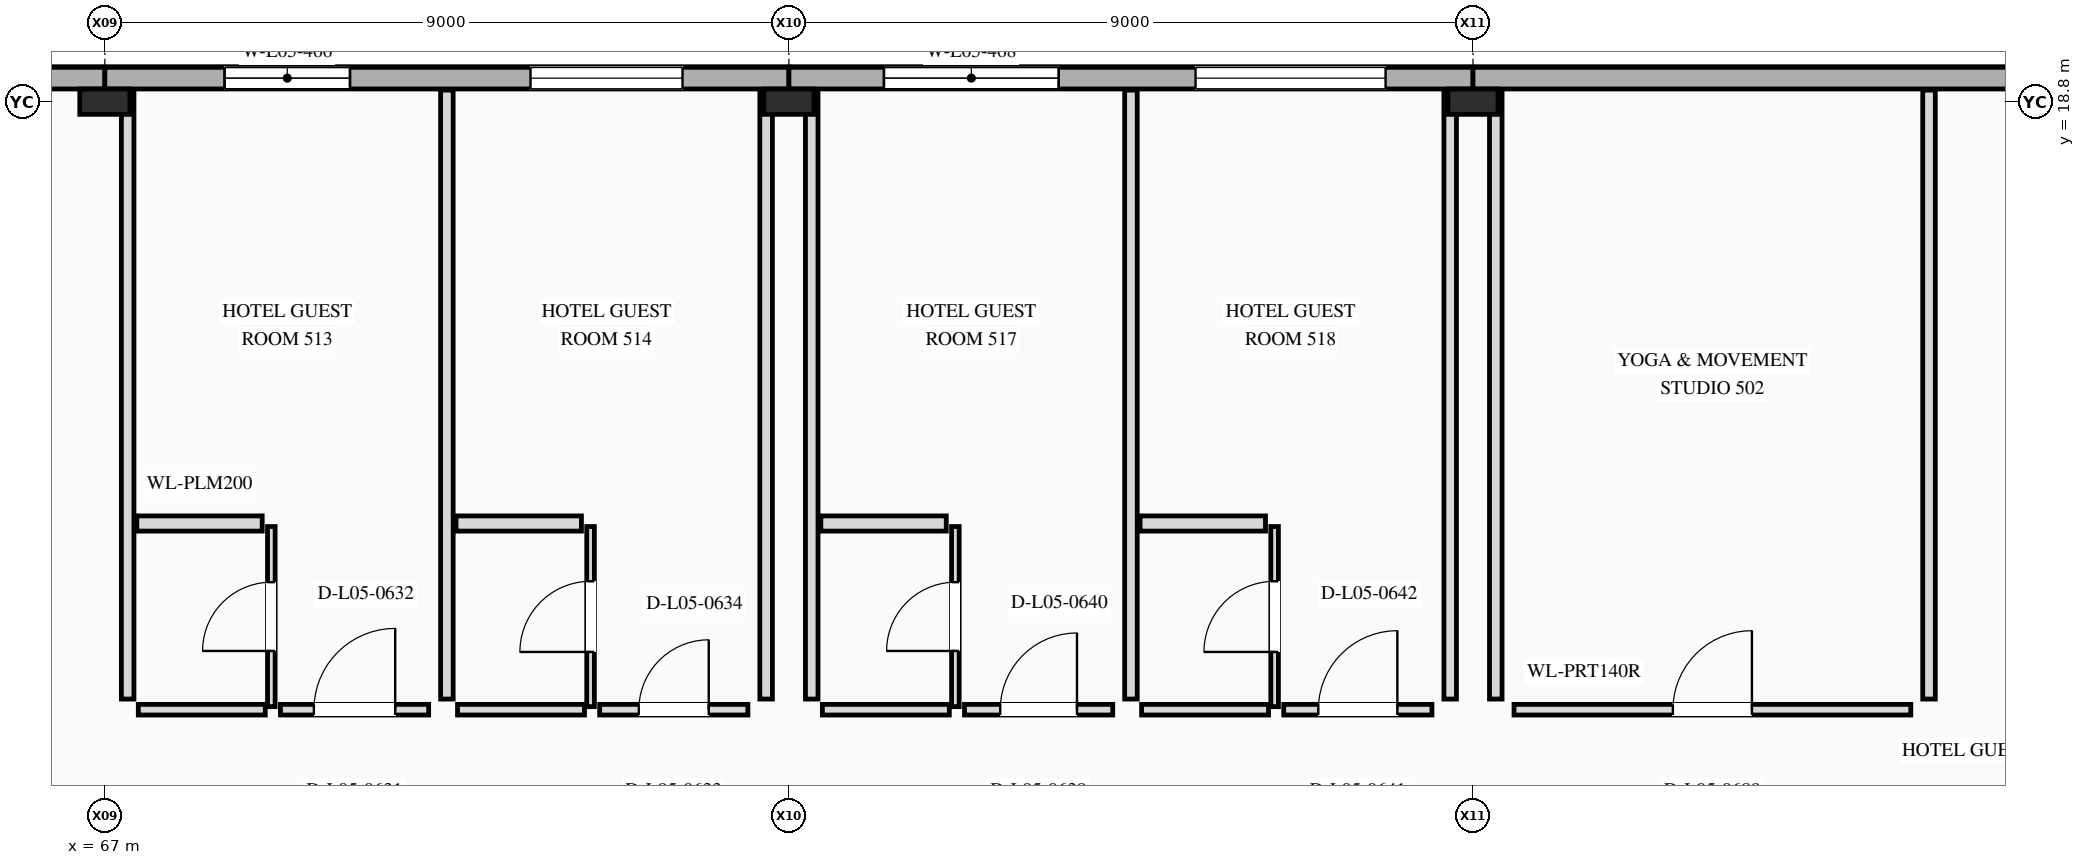
"""IFC4 building model, lengths in metres.
Left out: names, types, materials, properties, quantities, classifications, styles, units other than length and angle.
Written with IfcOpenShell. Run it as: python <this file> out.ifc"""

import sys

from ifc_helpers import new_model, si_unit, direction, frame, frame_2d, origin, origin_2d, place, context, subcontext, project, spatial, rectangle, i_section, extrude, element, fill, save


model = new_model("IFC4")
c1 = context("Model", 3, precision=1e-05, world=origin(), true_north=direction((0.0, 1.0)))
c2 = subcontext(c1, "Body", "Model", "MODEL_VIEW")
j1 = project(units=[si_unit("LENGTHUNIT", "METRE"), si_unit("PLANEANGLEUNIT", "RADIAN")], contexts=[c1])
p1 = place(None, origin())
s1 = spatial("IfcSite", under=j1, at=p1, CompositionType="ELEMENT")
p2 = place(p1, origin())
s2 = spatial("IfcBuilding", under=s1, at=p2, CompositionType="ELEMENT")
p3 = place(p2, frame((0.0, 0.0, 23.4)))
s3 = spatial("IfcBuildingStorey", under=s2, at=p3, CompositionType="ELEMENT", Elevation=23.4)
for number, where, z_axis, x_axis in (
    (1, (67.0, 18.8, 0.0), (0.0, 0.0, 1.0), (0.0, 1.0, 0.0)),
    (2, (76.0, 18.8, 0.0), (0.0, 0.0, 1.0), (0.0, 1.0, 0.0)),
    (3, (85.0, 18.8, 0.0), (0.0, 0.0, 1.0), (0.0, 1.0, 0.0)),
):
    element("IfcColumn", number, at=place(p3, frame(where, z_axis=z_axis, x_axis=x_axis)), inside=s3, PredefinedType="COLUMN", context=c2, shape_type="SweptSolid", body=[
        extrude(i_section(OverallWidth=0.333, OverallDepth=0.66, WebThickness=0.024, FlangeThickness=0.044, at=origin_2d()), origin(), (0.0, 0.0, 1.0), 3.6),
    ])
p4 = place(p3, frame((67.0, 19.11, 0.0), z_axis=(0.0, 0.0, 1.0), x_axis=(-1.0, 0.0, 0.0)))
e4 = element("IfcWall", 4, at=p4, inside=s3, PredefinedType="STANDARD", context=c2, shape_type="SweptSolid", body=[
    extrude(rectangle(XDim=9.0, YDim=0.285, at=frame_2d((4.5, 0.0))), origin(), (0.0, 0.0, 1.0), 3.6),
])
p5 = place(p3, frame((76.0, 19.11, 0.0), z_axis=(0.0, 0.0, 1.0), x_axis=(-1.0, 0.0, 0.0)))
e5 = element("IfcWall", 5, at=p5, inside=s3, PredefinedType="STANDARD", context=c2, shape_type="SweptSolid", body=[
    extrude(rectangle(XDim=9.0, YDim=0.285, at=frame_2d((4.5, 0.0))), origin(), (0.0, 0.0, 1.0), 3.6),
])
p6 = place(p5, frame((5.775, 0.0, 0.85)))
e6 = element("IfcOpeningElement", 6, at=p6, cuts=e5, PredefinedType="OPENING", context=c2, shape_type="SweptSolid", body=[
    extrude(rectangle(XDim=1.65, YDim=1.75, at=frame_2d((0.825, 0.875))), frame((0.0, 0.152, 0.0), z_axis=(0.0, -1.0, 0.0), x_axis=(1.0, 0.0, 0.0)), (0.0, 0.0, 1.0), 0.305),
])
p7 = place(p5, frame((1.4, 0.0, 0.85)))
e7 = element("IfcOpeningElement", 7, at=p7, cuts=e5, PredefinedType="OPENING", context=c2, shape_type="SweptSolid", body=[
    extrude(rectangle(XDim=2.0, YDim=1.65, at=frame_2d((1.0, 0.825))), frame((0.0, 0.152, 0.0), z_axis=(0.0, -1.0, 0.0), x_axis=(1.0, 0.0, 0.0)), (0.0, 0.0, 1.0), 0.305),
])
p8 = place(p3, frame((85.0, 19.11, 0.0), z_axis=(0.0, 0.0, 1.0), x_axis=(-1.0, 0.0, 0.0)))
e8 = element("IfcWall", 8, at=p8, inside=s3, PredefinedType="STANDARD", context=c2, shape_type="SweptSolid", body=[
    extrude(rectangle(XDim=9.0, YDim=0.285, at=frame_2d((4.5, 0.0))), origin(), (0.0, 0.0, 1.0), 3.6),
])
p9 = place(p8, frame((5.45, 0.0, 0.85)))
e9 = element("IfcOpeningElement", 9, at=p9, cuts=e8, PredefinedType="OPENING", context=c2, shape_type="SweptSolid", body=[
    extrude(rectangle(XDim=2.3, YDim=1.7, at=frame_2d((1.15, 0.85))), frame((0.0, 0.152, 0.0), z_axis=(0.0, -1.0, 0.0), x_axis=(1.0, 0.0, 0.0)), (0.0, 0.0, 1.0), 0.305),
])
p10 = place(p8, frame((1.15, 0.0, 0.85)))
e10 = element("IfcOpeningElement", 10, at=p10, cuts=e8, PredefinedType="OPENING", context=c2, shape_type="SweptSolid", body=[
    extrude(rectangle(XDim=2.5, YDim=1.75, at=frame_2d((1.25, 0.875))), frame((0.0, 0.152, 0.0), z_axis=(0.0, -1.0, 0.0), x_axis=(1.0, 0.0, 0.0)), (0.0, 0.0, 1.0), 0.305),
])
p11 = place(p3, frame((94.0, 19.11, 0.0), z_axis=(0.0, 0.0, 1.0), x_axis=(-1.0, 0.0, 0.0)))
e11 = element("IfcWall", 11, at=p11, inside=s3, PredefinedType="STANDARD", context=c2, shape_type="SweptSolid", body=[
    extrude(rectangle(XDim=9.0, YDim=0.285, at=frame_2d((4.5, 0.0))), origin(), (0.0, 0.0, 1.0), 3.6),
])
p12 = place(p3, frame((67.44, 10.8, 0.0), z_axis=(0.0, 0.0, 1.0), x_axis=(1.0, 0.0, 0.0)))
e12 = element("IfcWall", 12, at=p12, inside=s3, PredefinedType="PARTITIONING", context=c2, shape_type="SweptSolid", body=[
    extrude(rectangle(XDim=1.67, YDim=0.14, at=frame_2d((0.835, 0.0))), origin(), (0.0, 0.0, 1.0), 3.3),
])
p13 = place(p3, frame((69.31, 10.8, 0.0), z_axis=(0.0, 0.0, 1.0), x_axis=(1.0, 0.0, 0.0)))
e13 = element("IfcWall", 13, at=p13, inside=s3, PredefinedType="PARTITIONING", context=c2, shape_type="SweptSolid", body=[
    extrude(rectangle(XDim=1.95, YDim=0.14, at=frame_2d((0.975, 0.0))), origin(), (0.0, 0.0, 1.0), 3.3),
])
p14 = place(p13, frame((0.44, 0.0, 0.0)))
e14 = element("IfcOpeningElement", 14, at=p14, cuts=e13, PredefinedType="OPENING", context=c2, shape_type="SweptSolid", body=[
    extrude(rectangle(XDim=1.07, YDim=2.25, at=frame_2d((0.535, 1.125))), frame((0.0, 0.08, 0.0), z_axis=(0.0, -1.0, 0.0), x_axis=(1.0, 0.0, 0.0)), (0.0, 0.0, 1.0), 0.16),
])
p15 = place(p3, frame((67.3, 10.94, 0.0), z_axis=(0.0, 0.0, 1.0), x_axis=(0.0, 1.0, 0.0)))
e15 = element("IfcWall", 15, at=p15, inside=s3, PredefinedType="PARTITIONING", context=c2, shape_type="SweptSolid", body=[
    extrude(rectangle(XDim=8.012, YDim=0.165, at=frame_2d((4.006, 0.0))), origin(), (0.0, 0.0, 1.0), 2.629),
])
p16 = place(p3, frame((71.5, 10.94, 0.0), z_axis=(0.0, 0.0, 1.0), x_axis=(0.0, 1.0, 0.0)))
e16 = element("IfcWall", 16, at=p16, inside=s3, PredefinedType="PARTITIONING", context=c2, shape_type="SweptSolid", body=[
    extrude(rectangle(XDim=8.012, YDim=0.165, at=frame_2d((4.006, 0.0))), origin(), (0.0, 0.0, 1.0), 2.713),
])
p17 = place(p3, frame((69.19, 10.84, 0.0), z_axis=(0.0, 0.0, 1.0), x_axis=(0.0, 1.0, 0.0)))
e17 = element("IfcWall", 17, at=p17, inside=s3, PredefinedType="PARTITIONING", context=c2, shape_type="SweptSolid", body=[
    extrude(rectangle(XDim=2.37, YDim=0.1, at=frame_2d((1.185, 0.0))), origin(), (0.0, 0.0, 1.0), 2.908),
])
p18 = place(p17, frame((0.733, 0.0, 0.0)))
e18 = element("IfcOpeningElement", 18, at=p18, cuts=e17, PredefinedType="OPENING", context=c2, shape_type="SweptSolid", body=[
    extrude(rectangle(XDim=0.905, YDim=2.1, at=frame_2d((0.453, 1.05))), frame((0.0, 0.06, 0.0), z_axis=(0.0, -1.0, 0.0), x_axis=(1.0, 0.0, 0.0)), (0.0, 0.0, 1.0), 0.12),
])
p19 = place(p3, frame((67.42, 13.25, 0.0), z_axis=(0.0, 0.0, 1.0), x_axis=(1.0, 0.0, 0.0)))
e19 = element("IfcWall", 19, at=p19, inside=s3, PredefinedType="PLUMBINGWALL", context=c2, shape_type="SweptSolid", body=[
    extrude(rectangle(XDim=1.65, YDim=0.2, at=frame_2d((0.825, 0.0))), origin(), (0.0, 0.0, 1.0), 3.3),
])
p20 = place(p3, frame((71.64, 10.8, 0.0), z_axis=(0.0, 0.0, 1.0), x_axis=(1.0, 0.0, 0.0)))
e20 = element("IfcWall", 20, at=p20, inside=s3, PredefinedType="PARTITIONING", context=c2, shape_type="SweptSolid", body=[
    extrude(rectangle(XDim=1.67, YDim=0.14, at=frame_2d((0.835, 0.0))), origin(), (0.0, 0.0, 1.0), 3.3),
])
p21 = place(p3, frame((73.51, 10.8, 0.0), z_axis=(0.0, 0.0, 1.0), x_axis=(1.0, 0.0, 0.0)))
e21 = element("IfcWall", 21, at=p21, inside=s3, PredefinedType="PARTITIONING", context=c2, shape_type="SweptSolid", body=[
    extrude(rectangle(XDim=1.95, YDim=0.14, at=frame_2d((0.975, 0.0))), origin(), (0.0, 0.0, 1.0), 3.3),
])
p22 = place(p21, frame((0.515, 0.0, 0.0)))
e22 = element("IfcOpeningElement", 22, at=p22, cuts=e21, PredefinedType="OPENING", context=c2, shape_type="SweptSolid", body=[
    extrude(rectangle(XDim=0.92, YDim=2.3, at=frame_2d((0.46, 1.15))), frame((0.0, 0.08, 0.0), z_axis=(0.0, -1.0, 0.0), x_axis=(1.0, 0.0, 0.0)), (0.0, 0.0, 1.0), 0.16),
])
p23 = place(p3, frame((75.7, 10.94, 0.0), z_axis=(0.0, 0.0, 1.0), x_axis=(0.0, 1.0, 0.0)))
e23 = element("IfcWall", 23, at=p23, inside=s3, PredefinedType="PARTITIONING", context=c2, shape_type="SweptSolid", body=[
    extrude(rectangle(XDim=8.012, YDim=0.165, at=frame_2d((4.006, 0.0))), origin(), (0.0, 0.0, 1.0), 2.629),
])
p24 = place(p3, frame((73.39, 10.84, 0.0), z_axis=(0.0, 0.0, 1.0), x_axis=(0.0, 1.0, 0.0)))
e24 = element("IfcWall", 24, at=p24, inside=s3, PredefinedType="PARTITIONING", context=c2, shape_type="SweptSolid", body=[
    extrude(rectangle(XDim=2.37, YDim=0.1, at=frame_2d((1.185, 0.0))), origin(), (0.0, 0.0, 1.0), 2.908),
])
p25 = place(p24, frame((0.72, 0.0, 0.0)))
e25 = element("IfcOpeningElement", 25, at=p25, cuts=e24, PredefinedType="OPENING", context=c2, shape_type="SweptSolid", body=[
    extrude(rectangle(XDim=0.93, YDim=2.14, at=frame_2d((0.465, 1.07))), frame((0.0, 0.06, 0.0), z_axis=(0.0, -1.0, 0.0), x_axis=(1.0, 0.0, 0.0)), (0.0, 0.0, 1.0), 0.12),
])
p26 = place(p3, frame((71.62, 13.25, 0.0), z_axis=(0.0, 0.0, 1.0), x_axis=(1.0, 0.0, 0.0)))
e26 = element("IfcWall", 26, at=p26, inside=s3, PredefinedType="PLUMBINGWALL", context=c2, shape_type="SweptSolid", body=[
    extrude(rectangle(XDim=1.65, YDim=0.2, at=frame_2d((0.825, 0.0))), origin(), (0.0, 0.0, 1.0), 3.3),
])
p27 = place(p3, frame((76.44, 10.8, 0.0), z_axis=(0.0, 0.0, 1.0), x_axis=(1.0, 0.0, 0.0)))
e27 = element("IfcWall", 27, at=p27, inside=s3, PredefinedType="PARTITIONING", context=c2, shape_type="SweptSolid", body=[
    extrude(rectangle(XDim=1.67, YDim=0.14, at=frame_2d((0.835, 0.0))), origin(), (0.0, 0.0, 1.0), 3.3),
])
p28 = place(p3, frame((78.31, 10.8, 0.0), z_axis=(0.0, 0.0, 1.0), x_axis=(1.0, 0.0, 0.0)))
e28 = element("IfcWall", 28, at=p28, inside=s3, PredefinedType="PARTITIONING", context=c2, shape_type="SweptSolid", body=[
    extrude(rectangle(XDim=1.95, YDim=0.14, at=frame_2d((0.975, 0.0))), origin(), (0.0, 0.0, 1.0), 3.3),
])
p29 = place(p28, frame((0.47, 0.0, 0.0)))
e29 = element("IfcOpeningElement", 29, at=p29, cuts=e28, PredefinedType="OPENING", context=c2, shape_type="SweptSolid", body=[
    extrude(rectangle(XDim=1.01, YDim=2.35, at=frame_2d((0.505, 1.175))), frame((0.0, 0.08, 0.0), z_axis=(0.0, -1.0, 0.0), x_axis=(1.0, 0.0, 0.0)), (0.0, 0.0, 1.0), 0.16),
])
p30 = place(p3, frame((76.3, 10.94, 0.0), z_axis=(0.0, 0.0, 1.0), x_axis=(0.0, 1.0, 0.0)))
e30 = element("IfcWall", 30, at=p30, inside=s3, PredefinedType="PARTITIONING", context=c2, shape_type="SweptSolid", body=[
    extrude(rectangle(XDim=8.012, YDim=0.165, at=frame_2d((4.006, 0.0))), origin(), (0.0, 0.0, 1.0), 2.629),
])
p31 = place(p3, frame((80.5, 10.94, 0.0), z_axis=(0.0, 0.0, 1.0), x_axis=(0.0, 1.0, 0.0)))
e31 = element("IfcWall", 31, at=p31, inside=s3, PredefinedType="PARTITIONING", context=c2, shape_type="SweptSolid", body=[
    extrude(rectangle(XDim=8.012, YDim=0.165, at=frame_2d((4.006, 0.0))), origin(), (0.0, 0.0, 1.0), 2.713),
])
p32 = place(p3, frame((78.19, 10.84, 0.0), z_axis=(0.0, 0.0, 1.0), x_axis=(0.0, 1.0, 0.0)))
e32 = element("IfcWall", 32, at=p32, inside=s3, PredefinedType="PARTITIONING", context=c2, shape_type="SweptSolid", body=[
    extrude(rectangle(XDim=2.37, YDim=0.1, at=frame_2d((1.185, 0.0))), origin(), (0.0, 0.0, 1.0), 2.908),
])
p33 = place(p32, frame((0.733, 0.0, 0.0)))
e33 = element("IfcOpeningElement", 33, at=p33, cuts=e32, PredefinedType="OPENING", context=c2, shape_type="SweptSolid", body=[
    extrude(rectangle(XDim=0.905, YDim=2.18, at=frame_2d((0.453, 1.09))), frame((0.0, 0.06, 0.0), z_axis=(0.0, -1.0, 0.0), x_axis=(1.0, 0.0, 0.0)), (0.0, 0.0, 1.0), 0.12),
])
p34 = place(p3, frame((76.42, 13.25, 0.0), z_axis=(0.0, 0.0, 1.0), x_axis=(1.0, 0.0, 0.0)))
e34 = element("IfcWall", 34, at=p34, inside=s3, PredefinedType="PLUMBINGWALL", context=c2, shape_type="SweptSolid", body=[
    extrude(rectangle(XDim=1.65, YDim=0.2, at=frame_2d((0.825, 0.0))), origin(), (0.0, 0.0, 1.0), 3.3),
])
p35 = place(p3, frame((80.64, 10.8, 0.0), z_axis=(0.0, 0.0, 1.0), x_axis=(1.0, 0.0, 0.0)))
e35 = element("IfcWall", 35, at=p35, inside=s3, PredefinedType="PARTITIONING", context=c2, shape_type="SweptSolid", body=[
    extrude(rectangle(XDim=1.67, YDim=0.14, at=frame_2d((0.835, 0.0))), origin(), (0.0, 0.0, 1.0), 3.3),
])
p36 = place(p3, frame((82.51, 10.8, 0.0), z_axis=(0.0, 0.0, 1.0), x_axis=(1.0, 0.0, 0.0)))
e36 = element("IfcWall", 36, at=p36, inside=s3, PredefinedType="PARTITIONING", context=c2, shape_type="SweptSolid", body=[
    extrude(rectangle(XDim=1.95, YDim=0.14, at=frame_2d((0.975, 0.0))), origin(), (0.0, 0.0, 1.0), 3.3),
])
p37 = place(p36, frame((0.455, 0.0, 0.0)))
e37 = element("IfcOpeningElement", 37, at=p37, cuts=e36, PredefinedType="OPENING", context=c2, shape_type="SweptSolid", body=[
    extrude(rectangle(XDim=1.04, YDim=2.4, at=frame_2d((0.52, 1.2))), frame((0.0, 0.08, 0.0), z_axis=(0.0, -1.0, 0.0), x_axis=(1.0, 0.0, 0.0)), (0.0, 0.0, 1.0), 0.16),
])
p38 = place(p3, frame((84.7, 10.94, 0.0), z_axis=(0.0, 0.0, 1.0), x_axis=(0.0, 1.0, 0.0)))
e38 = element("IfcWall", 38, at=p38, inside=s3, PredefinedType="PARTITIONING", context=c2, shape_type="SweptSolid", body=[
    extrude(rectangle(XDim=8.012, YDim=0.165, at=frame_2d((4.006, 0.0))), origin(), (0.0, 0.0, 1.0), 2.629),
])
p39 = place(p3, frame((82.39, 10.84, 0.0), z_axis=(0.0, 0.0, 1.0), x_axis=(0.0, 1.0, 0.0)))
e39 = element("IfcWall", 39, at=p39, inside=s3, PredefinedType="PARTITIONING", context=c2, shape_type="SweptSolid", body=[
    extrude(rectangle(XDim=2.37, YDim=0.1, at=frame_2d((1.185, 0.0))), origin(), (0.0, 0.0, 1.0), 2.908),
])
p40 = place(p39, frame((0.72, 0.0, 0.0)))
e40 = element("IfcOpeningElement", 40, at=p40, cuts=e39, PredefinedType="OPENING", context=c2, shape_type="SweptSolid", body=[
    extrude(rectangle(XDim=0.93, YDim=2.22, at=frame_2d((0.465, 1.11))), frame((0.0, 0.06, 0.0), z_axis=(0.0, -1.0, 0.0), x_axis=(1.0, 0.0, 0.0)), (0.0, 0.0, 1.0), 0.12),
])
p41 = place(p3, frame((80.62, 13.25, 0.0), z_axis=(0.0, 0.0, 1.0), x_axis=(1.0, 0.0, 0.0)))
e41 = element("IfcWall", 41, at=p41, inside=s3, PredefinedType="PLUMBINGWALL", context=c2, shape_type="SweptSolid", body=[
    extrude(rectangle(XDim=1.65, YDim=0.2, at=frame_2d((0.825, 0.0))), origin(), (0.0, 0.0, 1.0), 3.3),
])
p42 = place(p3, frame((85.54, 10.8, 0.0), z_axis=(0.0, 0.0, 1.0), x_axis=(1.0, 0.0, 0.0)))
e42 = element("IfcWall", 42, at=p42, inside=s3, PredefinedType="PARTITIONING", context=c2, shape_type="SweptSolid", body=[
    extrude(rectangle(XDim=5.22, YDim=0.14, at=frame_2d((2.61, 0.0))), origin(), (0.0, 0.0, 1.0), 3.3),
])
p43 = place(p42, frame((2.09, 0.0, 0.0)))
e43 = element("IfcOpeningElement", 43, at=p43, cuts=e42, PredefinedType="OPENING", context=c2, shape_type="SweptSolid", body=[
    extrude(rectangle(XDim=1.04, YDim=2.4, at=frame_2d((0.52, 1.2))), frame((0.0, 0.08, 0.0), z_axis=(0.0, -1.0, 0.0), x_axis=(1.0, 0.0, 0.0)), (0.0, 0.0, 1.0), 0.16),
])
p44 = place(p3, frame((85.3, 10.94, 0.0), z_axis=(0.0, 0.0, 1.0), x_axis=(0.0, 1.0, 0.0)))
e44 = element("IfcWall", 44, at=p44, inside=s3, PredefinedType="PARTITIONING", context=c2, shape_type="SweptSolid", body=[
    extrude(rectangle(XDim=8.012, YDim=0.165, at=frame_2d((4.006, 0.0))), origin(), (0.0, 0.0, 1.0), 2.629),
])
p45 = place(p3, frame((91.0, 10.94, 0.0), z_axis=(0.0, 0.0, 1.0), x_axis=(0.0, 1.0, 0.0)))
e45 = element("IfcWall", 45, at=p45, inside=s3, PredefinedType="PARTITIONING", context=c2, shape_type="SweptSolid", body=[
    extrude(rectangle(XDim=8.012, YDim=0.165, at=frame_2d((4.006, 0.0))), origin(), (0.0, 0.0, 1.0), 3.3),
])
p46 = place(p6, origin())
e46 = element("IfcWindow", 46, at=p46, inside=s3, PartitioningType="SINGLE_PANEL", PredefinedType="WINDOW", context=c2, shape_type="SweptSolid", body=[
    extrude(rectangle(XDim=1.65, YDim=1.75, at=frame_2d((0.825, 0.875))), frame((0.0, 0.03, 0.0), z_axis=(0.0, -1.0, 0.0), x_axis=(1.0, 0.0, 0.0)), (0.0, 0.0, 1.0), 0.06),
])
fill(e6, e46)
p47 = place(p7, origin())
e47 = element("IfcWindow", 47, at=p47, inside=s3, PartitioningType="SINGLE_PANEL", PredefinedType="WINDOW", context=c2, shape_type="SweptSolid", body=[
    extrude(rectangle(XDim=2.0, YDim=1.65, at=frame_2d((1.0, 0.825))), frame((0.0, 0.03, 0.0), z_axis=(0.0, -1.0, 0.0), x_axis=(1.0, 0.0, 0.0)), (0.0, 0.0, 1.0), 0.06),
])
fill(e7, e47)
p48 = place(p9, origin())
e48 = element("IfcWindow", 48, at=p48, inside=s3, PartitioningType="SINGLE_PANEL", PredefinedType="WINDOW", context=c2, shape_type="SweptSolid", body=[
    extrude(rectangle(XDim=2.3, YDim=1.7, at=frame_2d((1.15, 0.85))), frame((0.0, 0.03, 0.0), z_axis=(0.0, -1.0, 0.0), x_axis=(1.0, 0.0, 0.0)), (0.0, 0.0, 1.0), 0.06),
])
fill(e9, e48)
p49 = place(p10, origin())
e49 = element("IfcWindow", 49, at=p49, inside=s3, PartitioningType="SINGLE_PANEL", PredefinedType="WINDOW", context=c2, shape_type="SweptSolid", body=[
    extrude(rectangle(XDim=2.5, YDim=1.75, at=frame_2d((1.25, 0.875))), frame((0.0, 0.03, 0.0), z_axis=(0.0, -1.0, 0.0), x_axis=(1.0, 0.0, 0.0)), (0.0, 0.0, 1.0), 0.06),
])
fill(e10, e49)
p50 = place(p14, origin())
e50 = element("IfcDoor", 50, at=p50, inside=s3, OperationType="SINGLE_SWING_RIGHT", PredefinedType="DOOR", context=c2, shape_type="SweptSolid", body=[
    extrude(rectangle(XDim=1.07, YDim=2.25, at=frame_2d((0.535, 1.125))), frame((0.0, 0.025, 0.0), z_axis=(0.0, -1.0, 0.0), x_axis=(1.0, 0.0, 0.0)), (0.0, 0.0, 1.0), 0.05),
])
fill(e14, e50)
p51 = place(p18, origin())
e51 = element("IfcDoor", 51, at=p51, inside=s3, OperationType="SINGLE_SWING_LEFT", PredefinedType="DOOR", context=c2, shape_type="SweptSolid", body=[
    extrude(rectangle(XDim=0.905, YDim=2.1, at=frame_2d((0.453, 1.05))), frame((0.0, 0.025, 0.0), z_axis=(0.0, -1.0, 0.0), x_axis=(1.0, 0.0, 0.0)), (0.0, 0.0, 1.0), 0.05),
])
fill(e18, e51)
p52 = place(p22, origin())
e52 = element("IfcDoor", 52, at=p52, inside=s3, OperationType="SINGLE_SWING_RIGHT", PredefinedType="DOOR", context=c2, shape_type="SweptSolid", body=[
    extrude(rectangle(XDim=0.92, YDim=2.3, at=frame_2d((0.46, 1.15))), frame((0.0, 0.025, 0.0), z_axis=(0.0, -1.0, 0.0), x_axis=(1.0, 0.0, 0.0)), (0.0, 0.0, 1.0), 0.05),
])
fill(e22, e52)
p53 = place(p25, origin())
e53 = element("IfcDoor", 53, at=p53, inside=s3, OperationType="SINGLE_SWING_LEFT", PredefinedType="DOOR", context=c2, shape_type="SweptSolid", body=[
    extrude(rectangle(XDim=0.93, YDim=2.14, at=frame_2d((0.465, 1.07))), frame((0.0, 0.025, 0.0), z_axis=(0.0, -1.0, 0.0), x_axis=(1.0, 0.0, 0.0)), (0.0, 0.0, 1.0), 0.05),
])
fill(e25, e53)
p54 = place(p29, origin())
e54 = element("IfcDoor", 54, at=p54, inside=s3, OperationType="SINGLE_SWING_RIGHT", PredefinedType="DOOR", context=c2, shape_type="SweptSolid", body=[
    extrude(rectangle(XDim=1.01, YDim=2.35, at=frame_2d((0.505, 1.175))), frame((0.0, 0.025, 0.0), z_axis=(0.0, -1.0, 0.0), x_axis=(1.0, 0.0, 0.0)), (0.0, 0.0, 1.0), 0.05),
])
fill(e29, e54)
p55 = place(p33, origin())
e55 = element("IfcDoor", 55, at=p55, inside=s3, OperationType="SINGLE_SWING_LEFT", PredefinedType="DOOR", context=c2, shape_type="SweptSolid", body=[
    extrude(rectangle(XDim=0.905, YDim=2.18, at=frame_2d((0.453, 1.09))), frame((0.0, 0.025, 0.0), z_axis=(0.0, -1.0, 0.0), x_axis=(1.0, 0.0, 0.0)), (0.0, 0.0, 1.0), 0.05),
])
fill(e33, e55)
p56 = place(p37, origin())
e56 = element("IfcDoor", 56, at=p56, inside=s3, OperationType="SINGLE_SWING_RIGHT", PredefinedType="DOOR", context=c2, shape_type="SweptSolid", body=[
    extrude(rectangle(XDim=1.04, YDim=2.4, at=frame_2d((0.52, 1.2))), frame((0.0, 0.025, 0.0), z_axis=(0.0, -1.0, 0.0), x_axis=(1.0, 0.0, 0.0)), (0.0, 0.0, 1.0), 0.05),
])
fill(e37, e56)
p57 = place(p40, origin())
e57 = element("IfcDoor", 57, at=p57, inside=s3, OperationType="SINGLE_SWING_LEFT", PredefinedType="DOOR", context=c2, shape_type="SweptSolid", body=[
    extrude(rectangle(XDim=0.93, YDim=2.22, at=frame_2d((0.465, 1.11))), frame((0.0, 0.025, 0.0), z_axis=(0.0, -1.0, 0.0), x_axis=(1.0, 0.0, 0.0)), (0.0, 0.0, 1.0), 0.05),
])
fill(e40, e57)
p58 = place(p43, origin())
e58 = element("IfcDoor", 58, at=p58, inside=s3, OperationType="SINGLE_SWING_RIGHT", PredefinedType="DOOR", context=c2, shape_type="SweptSolid", body=[
    extrude(rectangle(XDim=1.04, YDim=2.4, at=frame_2d((0.52, 1.2))), frame((0.0, 0.025, 0.0), z_axis=(0.0, -1.0, 0.0), x_axis=(1.0, 0.0, 0.0)), (0.0, 0.0, 1.0), 0.05),
])
fill(e43, e58)
save(model, sys.argv[1])
